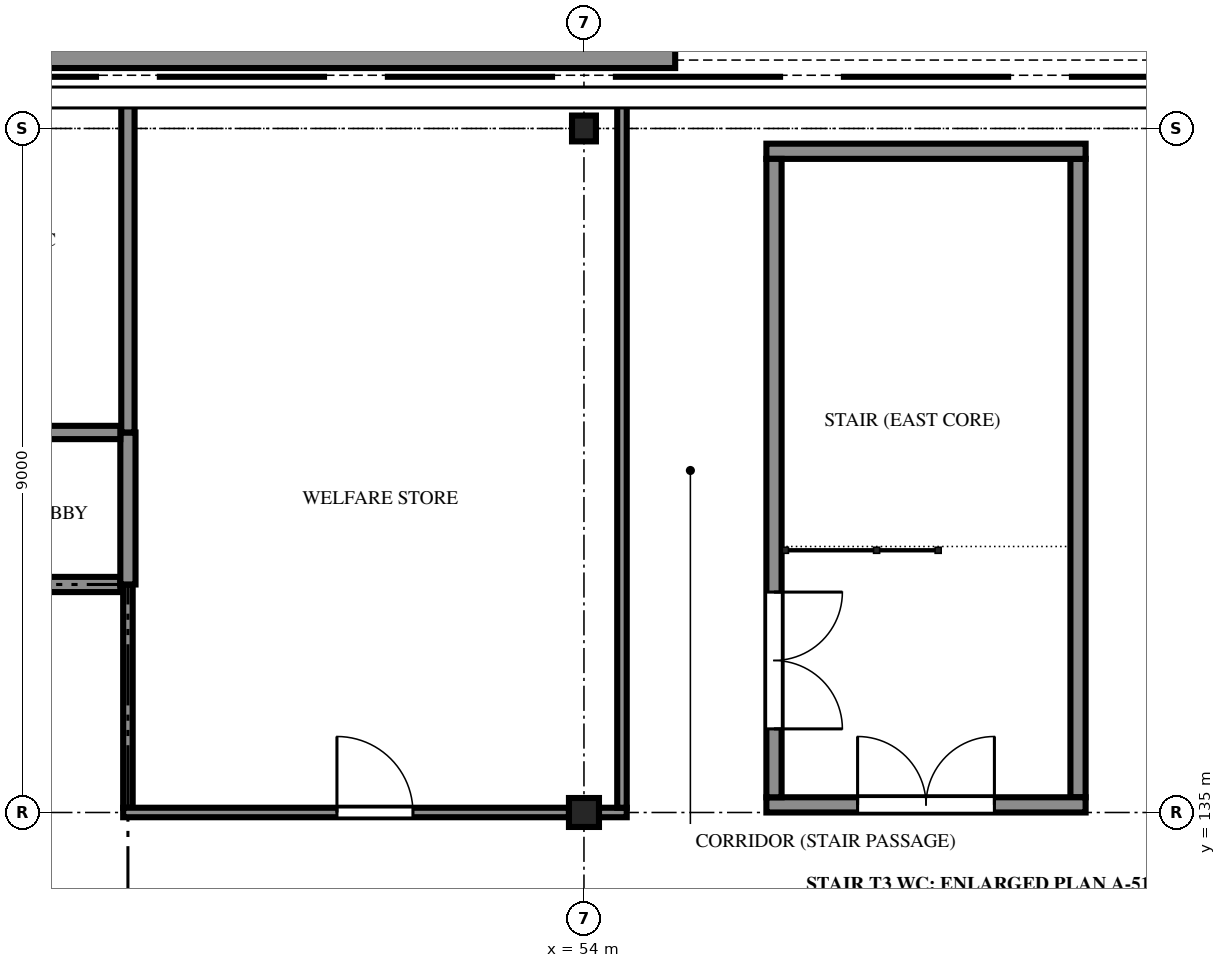
"""IFC4 building model, lengths in metres.
Left out: names, types, materials, properties, quantities, classifications, styles, units other than length and angle.
Written with IfcOpenShell. Run it as: python <this file> out.ifc"""

import sys

from ifc_helpers import new_model, si_unit, direction, frame, frame_2d, origin, origin_2d, place, context, subcontext, project, spatial, polyline, rectangle, i_section, outline, extrude, element, fill, save


model = new_model("IFC4")
c1 = context("Model", 3, precision=1e-05, world=origin(), true_north=direction((0.0, 1.0)))
c2 = subcontext(c1, "Body", "Model", "MODEL_VIEW")
j1 = project(units=[si_unit("LENGTHUNIT", "METRE"), si_unit("PLANEANGLEUNIT", "RADIAN")], contexts=[c1])
p1 = place(None, origin())
s1 = spatial("IfcSite", under=j1, at=p1, CompositionType="ELEMENT")
p2 = place(p1, origin())
s2 = spatial("IfcBuilding", under=s1, at=p2, CompositionType="ELEMENT")
p3 = place(p2, frame((0.0, 0.0, 32.7)))
s3 = spatial("IfcBuildingStorey", under=s2, at=p3, CompositionType="ELEMENT", Elevation=32.7)
p4 = place(p3, frame((54.0, 135.0, 0.0), z_axis=(0.0, 0.0, 1.0), x_axis=(1.0, 0.0, 0.0)))
e1 = element("IfcColumn", 1, at=p4, inside=s3, PredefinedType="COLUMN", context=c2, shape_type="SweptSolid", body=[
    extrude(i_section(OverallWidth=0.395, OverallDepth=0.381, WebThickness=0.018, FlangeThickness=0.03, FilletRadius=0.015, at=origin_2d()), origin(), (0.0, 0.0, 1.0), 4.2),
])
p5 = place(p3, frame((54.0, 144.0, 0.0), z_axis=(0.0, 0.0, 1.0), x_axis=(1.0, 0.0, 0.0)))
e2 = element("IfcColumn", 2, at=p5, inside=s3, PredefinedType="COLUMN", context=c2, shape_type="SweptSolid", body=[
    extrude(i_section(OverallWidth=0.314, OverallDepth=0.34, WebThickness=0.019, FlangeThickness=0.031, FilletRadius=0.015, at=origin_2d()), origin(), (0.0, 0.0, 1.0), 4.2),
])
p6 = place(p3, frame((43.8, 145.62, 0.0), z_axis=(0.0, 0.0, 1.0), x_axis=(1.0, 0.0, 0.0)))
e3 = element("IfcWall", 3, at=p6, inside=s3, PredefinedType="SOLIDWALL", context=c2, shape_type="SweptSolid", body=[
    extrude(outline(polyline([(11.4, 0.0), (11.4, 4.2), (0.0, 4.2), (0.0, 0.0), (11.4, 0.0)])), frame((0.0, 0.825, 0.0), z_axis=(0.0, -1.0, 0.0), x_axis=(1.0, 0.0, 0.0)), (0.0, 0.0, 1.0), 1.65),
])
p7 = place(p3, frame((56.4, 135.1, -0.13), z_axis=(0.0, 0.0, 1.0), x_axis=(1.0, 0.0, 0.0)))
e4 = element("IfcWall", 4, at=p7, inside=s3, PredefinedType="SOLIDWALL", context=c2, shape_type="SweptSolid", body=[
    extrude(rectangle(XDim=4.2, YDim=0.2, at=frame_2d((2.1, 0.0))), origin(), (0.0, 0.0, 1.0), 3.587),
])
p8 = place(p7, frame((1.2, 0.0, 0.13)))
e5 = element("IfcOpeningElement", 5, at=p8, cuts=e4, PredefinedType="OPENING", context=c2, shape_type="SweptSolid", body=[
    extrude(rectangle(XDim=1.8, YDim=2.1, at=frame_2d((0.9, 1.05))), frame((0.0, 0.11, 0.0), z_axis=(0.0, -1.0, 0.0), x_axis=(1.0, 0.0, 0.0)), (0.0, 0.0, 1.0), 0.22),
])
p9 = place(p3, frame((56.4, 143.7, 0.0), z_axis=(0.0, 0.0, 1.0), x_axis=(1.0, 0.0, 0.0)))
e6 = element("IfcWall", 6, at=p9, inside=s3, PredefinedType="SOLIDWALL", context=c2, shape_type="SweptSolid", body=[
    extrude(rectangle(XDim=4.2, YDim=0.2, at=frame_2d((2.1, 0.0))), origin(), (0.0, 0.0, 1.0), 3.457),
])
p10 = place(p3, frame((56.5, 135.2, -0.13), z_axis=(0.0, 0.0, 1.0), x_axis=(0.0, 1.0, 0.0)))
e7 = element("IfcWall", 7, at=p10, inside=s3, PredefinedType="SOLIDWALL", context=c2, shape_type="SweptSolid", body=[
    extrude(rectangle(XDim=8.4, YDim=0.2, at=frame_2d((4.2, 0.0))), origin(), (0.0, 0.0, 1.0), 3.587),
])
p11 = place(p10, frame((0.9, 0.0, 0.13)))
e8 = element("IfcOpeningElement", 8, at=p11, cuts=e7, PredefinedType="OPENING", context=c2, shape_type="SweptSolid", body=[
    extrude(rectangle(XDim=1.8, YDim=2.1, at=frame_2d((0.9, 1.05))), frame((0.0, 0.11, 0.0), z_axis=(0.0, -1.0, 0.0), x_axis=(1.0, 0.0, 0.0)), (0.0, 0.0, 1.0), 0.22),
])
p12 = place(p3, frame((60.5, 135.2, -0.13), z_axis=(0.0, 0.0, 1.0), x_axis=(0.0, 1.0, 0.0)))
e9 = element("IfcWall", 9, at=p12, inside=s3, PredefinedType="SOLIDWALL", context=c2, shape_type="SweptSolid", body=[
    extrude(rectangle(XDim=8.4, YDim=0.2, at=frame_2d((4.2, 0.0))), origin(), (0.0, 0.0, 1.0), 3.587),
])
p13 = place(p3, frame((38.0, 138.0, 0.0), z_axis=(0.0, 0.0, 1.0), x_axis=(1.0, 0.0, 0.0)))
e10 = element("IfcWall", 10, at=p13, inside=s3, PredefinedType="PARTITIONING", context=c2, shape_type="SweptSolid", body=[
    extrude(rectangle(XDim=9.9, YDim=0.2, at=frame_2d((4.95, 0.0))), origin(), (0.0, 0.0, 1.0), 3.382),
])
p14 = place(p13, frame((4.4, 0.0, 0.0)))
e11 = element("IfcOpeningElement", 11, at=p14, cuts=e10, PredefinedType="OPENING", context=c2, shape_type="SweptSolid", body=[
    extrude(rectangle(XDim=1.2, YDim=2.1, at=frame_2d((0.6, 1.05))), frame((0.0, 0.11, 0.0), z_axis=(0.0, -1.0, 0.0), x_axis=(1.0, 0.0, 0.0)), (0.0, 0.0, 1.0), 0.22),
])
p15 = place(p3, frame((48.0, 138.0, 0.0), z_axis=(0.0, 0.0, 1.0), x_axis=(0.0, -1.0, 0.0)))
e12 = element("IfcWall", 12, at=p15, inside=s3, PredefinedType="PARTITIONING", context=c2, shape_type="SweptSolid", body=[
    extrude(rectangle(XDim=2.938, YDim=0.125, at=frame_2d((1.469, 0.0))), origin(), (0.0, 0.0, 1.0), 3.382),
])
p16 = place(p3, frame((47.938, 135.0, 0.0), z_axis=(0.0, 0.0, 1.0), x_axis=(1.0, 0.0, 0.0)))
e13 = element("IfcWall", 13, at=p16, inside=s3, PredefinedType="PARTITIONING", context=c2, shape_type="SweptSolid", body=[
    extrude(rectangle(XDim=5.865, YDim=0.125, at=frame_2d((2.933, 0.0))), origin(), (0.0, 0.0, 1.0), 3.382),
])
p17 = place(p16, frame((2.812, 0.0, 0.0)))
e14 = element("IfcOpeningElement", 14, at=p17, cuts=e13, PredefinedType="OPENING", context=c2, shape_type="SweptSolid", body=[
    extrude(rectangle(XDim=1.0, YDim=2.1, at=frame_2d((0.5, 1.05))), frame((0.0, 0.073, 0.0), z_axis=(0.0, -1.0, 0.0), x_axis=(1.0, 0.0, 0.0)), (0.0, 0.0, 1.0), 0.145),
])
p18 = place(p3, frame((54.198, 135.0, 0.0), z_axis=(0.0, 0.0, 1.0), x_axis=(1.0, 0.0, 0.0)))
e15 = element("IfcWall", 15, at=p18, inside=s3, PredefinedType="PARTITIONING", context=c2, shape_type="SweptSolid", body=[
    extrude(rectangle(XDim=0.365, YDim=0.125, at=frame_2d((0.183, 0.0))), origin(), (0.0, 0.0, 1.0), 3.382),
])
p19 = place(p3, frame((54.5, 135.062, 0.0), z_axis=(0.0, 0.0, 1.0), x_axis=(0.0, 1.0, 0.0)))
e16 = element("IfcWall", 16, at=p19, inside=s3, PredefinedType="PARTITIONING", context=c2, shape_type="SweptSolid", body=[
    extrude(rectangle(XDim=9.252, YDim=0.125, at=frame_2d((4.626, 0.0))), origin(), (0.0, 0.0, 1.0), 3.382),
])
p20 = place(p3, frame((48.0, 140.0, 0.0), z_axis=(0.0, 0.0, 1.0), x_axis=(0.0, -1.0, 0.0)))
e17 = element("IfcWall", 17, at=p20, inside=s3, PredefinedType="PARTITIONING", context=c2, shape_type="SweptSolid", body=[
    extrude(rectangle(XDim=2.0, YDim=0.2, at=frame_2d((1.0, 0.0))), origin(), (0.0, 0.0, 1.0), 3.382),
])
p21 = place(p3, frame((44.2, 140.0, 0.0), z_axis=(0.0, 0.0, 1.0), x_axis=(1.0, 0.0, 0.0)))
e18 = element("IfcWall", 18, at=p21, inside=s3, PredefinedType="PARTITIONING", context=c2, shape_type="SweptSolid", body=[
    extrude(rectangle(XDim=3.7, YDim=0.175, at=frame_2d((1.85, 0.0))), origin(), (0.0, 0.0, 1.0), 3.382),
])
p22 = place(p21, frame((1.45, 0.0, 0.0)))
e19 = element("IfcOpeningElement", 19, at=p22, cuts=e18, PredefinedType="OPENING", context=c2, shape_type="SweptSolid", body=[
    extrude(rectangle(XDim=0.9, YDim=2.1, at=frame_2d((0.45, 1.05))), frame((0.0, 0.097, 0.0), z_axis=(0.0, -1.0, 0.0), x_axis=(1.0, 0.0, 0.0)), (0.0, 0.0, 1.0), 0.195),
])
p23 = place(p3, frame((48.0, 144.315, 0.0), z_axis=(0.0, 0.0, 1.0), x_axis=(0.0, -1.0, 0.0)))
e20 = element("IfcWall", 20, at=p23, inside=s3, PredefinedType="PARTITIONING", context=c2, shape_type="SweptSolid", body=[
    extrude(rectangle(XDim=4.315, YDim=0.175, at=frame_2d((2.157, 0.0))), origin(), (0.0, 0.0, 1.0), 3.382),
])
p24 = place(p11, frame((1.8, 0.0, 0.0), z_axis=(0.0, 0.0, 1.0), x_axis=(-1.0, 0.0, 0.0)))
e21 = element("IfcDoor", 21, at=p24, inside=s3, OperationType="DOUBLE_DOOR_SINGLE_SWING", PredefinedType="DOOR", context=c2, shape_type="SweptSolid", body=[
    extrude(outline(polyline([(0.0, 0.0), (0.07, 0.0), (0.07, 2.03), (1.73, 2.03), (1.73, 0.0), (1.8, 0.0), (1.8, 2.1), (0.0, 2.1), (0.0, 0.0)])), frame((0.0, 0.025, 0.0), z_axis=(0.0, -1.0, 0.0), x_axis=(1.0, 0.0, 0.0)), (0.0, 0.0, 1.0), 0.05),
    extrude(outline(polyline([(0.074, 0.01), (0.897, 0.01), (0.897, 2.026), (0.074, 2.026), (0.074, 0.01)]), holes=[polyline([(0.194, 0.16), (0.777, 0.16), (0.777, 1.01), (0.194, 1.01), (0.194, 0.16)]), polyline([(0.335, 1.16), (0.635, 1.16), (0.635, 1.76), (0.335, 1.76), (0.335, 1.16)])]), frame((0.0, 0.017, 0.0), z_axis=(0.0, -1.0, 0.0), x_axis=(1.0, 0.0, 0.0)), (0.0, 0.0, 1.0), 0.035),
    extrude(rectangle(XDim=0.583, YDim=0.85, at=frame_2d((0.485, 0.585))), frame((0.0, 0.009, 0.0), z_axis=(0.0, -1.0, 0.0), x_axis=(1.0, 0.0, 0.0)), (0.0, 0.0, 1.0), 0.017),
    extrude(rectangle(XDim=0.3, YDim=0.6, at=frame_2d((0.485, 1.46))), frame((0.0, 0.006, 0.0), z_axis=(0.0, -1.0, 0.0), x_axis=(1.0, 0.0, 0.0)), (0.0, 0.0, 1.0), 0.012),
    extrude(outline(polyline([(0.903, 0.01), (1.726, 0.01), (1.726, 2.026), (0.903, 2.026), (0.903, 0.01)]), holes=[polyline([(1.023, 0.16), (1.606, 0.16), (1.606, 1.01), (1.023, 1.01), (1.023, 0.16)]), polyline([(1.165, 1.16), (1.465, 1.16), (1.465, 1.76), (1.165, 1.76), (1.165, 1.16)])]), frame((0.0, 0.017, 0.0), z_axis=(0.0, -1.0, 0.0), x_axis=(1.0, 0.0, 0.0)), (0.0, 0.0, 1.0), 0.035),
    extrude(rectangle(XDim=0.583, YDim=0.85, at=frame_2d((1.314, 0.585))), frame((0.0, 0.009, 0.0), z_axis=(0.0, -1.0, 0.0), x_axis=(1.0, 0.0, 0.0)), (0.0, 0.0, 1.0), 0.017),
    extrude(rectangle(XDim=0.3, YDim=0.6, at=frame_2d((1.314, 1.46))), frame((0.0, 0.006, 0.0), z_axis=(0.0, -1.0, 0.0), x_axis=(1.0, 0.0, 0.0)), (0.0, 0.0, 1.0), 0.012),
])
fill(e8, e21)
p25 = place(p8, origin())
e22 = element("IfcDoor", 22, at=p25, inside=s3, OperationType="DOUBLE_DOOR_SINGLE_SWING", PredefinedType="DOOR", context=c2, shape_type="SweptSolid", body=[
    extrude(outline(polyline([(0.0, 0.0), (0.07, 0.0), (0.07, 2.03), (1.73, 2.03), (1.73, 0.0), (1.8, 0.0), (1.8, 2.1), (0.0, 2.1), (0.0, 0.0)])), frame((0.0, 0.025, 0.0), z_axis=(0.0, -1.0, 0.0), x_axis=(1.0, 0.0, 0.0)), (0.0, 0.0, 1.0), 0.05),
    extrude(outline(polyline([(0.074, 0.01), (0.897, 0.01), (0.897, 2.026), (0.074, 2.026), (0.074, 0.01)]), holes=[polyline([(0.194, 0.16), (0.777, 0.16), (0.777, 1.01), (0.194, 1.01), (0.194, 0.16)]), polyline([(0.335, 1.16), (0.635, 1.16), (0.635, 1.76), (0.335, 1.76), (0.335, 1.16)])]), frame((0.0, 0.017, 0.0), z_axis=(0.0, -1.0, 0.0), x_axis=(1.0, 0.0, 0.0)), (0.0, 0.0, 1.0), 0.035),
    extrude(rectangle(XDim=0.583, YDim=0.85, at=frame_2d((0.485, 0.585))), frame((0.0, 0.009, 0.0), z_axis=(0.0, -1.0, 0.0), x_axis=(1.0, 0.0, 0.0)), (0.0, 0.0, 1.0), 0.017),
    extrude(rectangle(XDim=0.3, YDim=0.6, at=frame_2d((0.485, 1.46))), frame((0.0, 0.006, 0.0), z_axis=(0.0, -1.0, 0.0), x_axis=(1.0, 0.0, 0.0)), (0.0, 0.0, 1.0), 0.012),
    extrude(outline(polyline([(0.903, 0.01), (1.726, 0.01), (1.726, 2.026), (0.903, 2.026), (0.903, 0.01)]), holes=[polyline([(1.023, 0.16), (1.606, 0.16), (1.606, 1.01), (1.023, 1.01), (1.023, 0.16)]), polyline([(1.165, 1.16), (1.465, 1.16), (1.465, 1.76), (1.165, 1.76), (1.165, 1.16)])]), frame((0.0, 0.017, 0.0), z_axis=(0.0, -1.0, 0.0), x_axis=(1.0, 0.0, 0.0)), (0.0, 0.0, 1.0), 0.035),
    extrude(rectangle(XDim=0.583, YDim=0.85, at=frame_2d((1.314, 0.585))), frame((0.0, 0.009, 0.0), z_axis=(0.0, -1.0, 0.0), x_axis=(1.0, 0.0, 0.0)), (0.0, 0.0, 1.0), 0.017),
    extrude(rectangle(XDim=0.3, YDim=0.6, at=frame_2d((1.314, 1.46))), frame((0.0, 0.006, 0.0), z_axis=(0.0, -1.0, 0.0), x_axis=(1.0, 0.0, 0.0)), (0.0, 0.0, 1.0), 0.012),
])
fill(e5, e22)
p26 = place(p17, origin())
e23 = element("IfcDoor", 23, at=p26, inside=s3, OperationType="SINGLE_SWING_LEFT", PredefinedType="DOOR", context=c2, shape_type="SweptSolid", body=[
    extrude(outline(polyline([(0.0, 0.0), (0.07, 0.0), (0.07, 2.03), (0.93, 2.03), (0.93, 0.0), (1.0, 0.0), (1.0, 2.1), (0.0, 2.1), (0.0, 0.0)])), frame((0.0, 0.025, 0.0), z_axis=(0.0, -1.0, 0.0), x_axis=(1.0, 0.0, 0.0)), (0.0, 0.0, 1.0), 0.05),
    extrude(outline(polyline([(0.074, 0.01), (0.926, 0.01), (0.926, 2.026), (0.074, 2.026), (0.074, 0.01)]), holes=[polyline([(0.194, 0.16), (0.806, 0.16), (0.806, 1.01), (0.194, 1.01), (0.194, 0.16)]), polyline([(0.35, 1.16), (0.65, 1.16), (0.65, 1.76), (0.35, 1.76), (0.35, 1.16)])]), frame((0.0, 0.017, 0.0), z_axis=(0.0, -1.0, 0.0), x_axis=(1.0, 0.0, 0.0)), (0.0, 0.0, 1.0), 0.035),
    extrude(rectangle(XDim=0.612, YDim=0.85, at=frame_2d((0.5, 0.585))), frame((0.0, 0.009, 0.0), z_axis=(0.0, -1.0, 0.0), x_axis=(1.0, 0.0, 0.0)), (0.0, 0.0, 1.0), 0.017),
    extrude(rectangle(XDim=0.3, YDim=0.6, at=frame_2d((0.5, 1.46))), frame((0.0, 0.006, 0.0), z_axis=(0.0, -1.0, 0.0), x_axis=(1.0, 0.0, 0.0)), (0.0, 0.0, 1.0), 0.012),
])
fill(e14, e23)
save(model, sys.argv[1])
